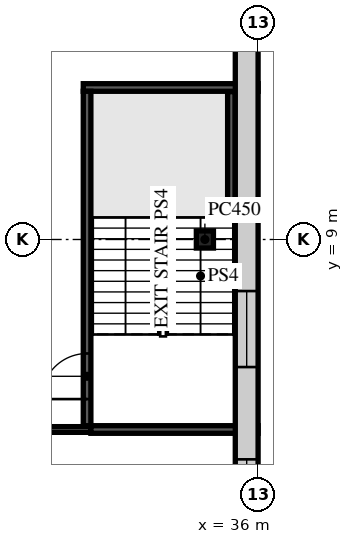
"""IFC4 building model, lengths in metres.
Left out: names, types, materials, properties, quantities, classifications, styles, units other than length and angle.
Written with IfcOpenShell. Run it as: python <this file> out.ifc"""

import sys

from ifc_helpers import new_model, si_unit, direction, frame, frame_2d, origin, origin_2d, place, context, subcontext, project, spatial, rectangle, extrude, element, fill, save


model = new_model("IFC4")
c1 = context("Model", 3, precision=1e-05, world=origin(), true_north=direction((0.0, 1.0)))
c2 = subcontext(c1, "Body", "Model", "MODEL_VIEW")
j1 = project(units=[si_unit("LENGTHUNIT", "METRE"), si_unit("PLANEANGLEUNIT", "RADIAN")], contexts=[c1])
p1 = place(None, origin())
s1 = spatial("IfcSite", under=j1, at=p1, CompositionType="ELEMENT")
p2 = place(p1, origin())
s2 = spatial("IfcBuilding", under=s1, at=p2, CompositionType="ELEMENT")
p3 = place(p2, frame((0.0, 0.0, 9.0)))
s3 = spatial("IfcBuildingStorey", under=s2, at=p3, CompositionType="ELEMENT", Elevation=9.0)
p4 = place(p3, frame((34.6, 9.0, 0.0), z_axis=(0.0, 0.0, 1.0), x_axis=(1.0, 0.0, 0.0)))
e1 = element("IfcColumn", 1, at=p4, inside=s3, PredefinedType="COLUMN", context=c2, shape_type="SweptSolid", body=[
    extrude(rectangle(XDim=0.45, YDim=0.45, at=origin_2d()), origin(), (0.0, 0.0, 1.0), 4.5),
])
p5 = place(p3, frame((28.075, 4.0, 0.0), z_axis=(0.0, 0.0, 1.0), x_axis=(1.0, 0.0, 0.0)))
e2 = element("IfcWall", 2, at=p5, inside=s3, PredefinedType="PARTITIONING", context=c2, shape_type="SweptSolid", body=[
    extrude(rectangle(XDim=3.525, YDim=0.15, at=frame_2d((1.763, 0.0))), origin(), (0.0, 0.0, 1.0), 4.1),
])
p6 = place(p3, frame((31.6, 4.0, 0.0), z_axis=(0.0, 0.0, 1.0), x_axis=(1.0, 0.0, 0.0)))
e3 = element("IfcWall", 3, at=p6, inside=s3, PredefinedType="PARTITIONING", context=c2, shape_type="SweptSolid", body=[
    extrude(rectangle(XDim=4.4, YDim=0.2, at=frame_2d((2.2, 0.0))), origin(), (0.0, 0.0, 1.0), 4.1),
])
p7 = place(p3, frame((31.4, 13.0, 0.0), z_axis=(0.0, 0.0, 1.0), x_axis=(1.0, 0.0, 0.0)))
e4 = element("IfcWall", 4, at=p7, inside=s3, PredefinedType="PARTITIONING", context=c2, shape_type="SweptSolid", body=[
    extrude(rectangle(XDim=4.6, YDim=0.2, at=frame_2d((2.3, 0.0))), origin(), (0.0, 0.0, 1.0), 4.1),
])
p8 = place(p3, frame((31.5, 4.1, 0.0), z_axis=(0.0, 0.0, 1.0), x_axis=(0.0, 1.0, 0.0)))
e5 = element("IfcWall", 5, at=p8, inside=s3, PredefinedType="PARTITIONING", context=c2, shape_type="SweptSolid", body=[
    extrude(rectangle(XDim=8.8, YDim=0.2, at=frame_2d((4.4, 0.0))), origin(), (0.0, 0.0, 1.0), 4.1),
])
p9 = place(p8, frame((0.7, 0.0, 0.0)))
e6 = element("IfcOpeningElement", 6, at=p9, cuts=e5, PredefinedType="OPENING", context=c2, shape_type="SweptSolid", body=[
    extrude(rectangle(XDim=1.2, YDim=2.1, at=frame_2d((0.6, 1.05))), frame((0.0, 0.11, 0.0), z_axis=(0.0, -1.0, 0.0), x_axis=(1.0, 0.0, 0.0)), (0.0, 0.0, 1.0), 0.22),
])
p10 = place(p3, frame((35.298, 9.581, 0.0), z_axis=(0.0, 0.0, 1.0), x_axis=(0.0, 1.0, 0.0)))
e7 = element("IfcWall", 7, at=p10, inside=s3, PredefinedType="PARTITIONING", context=c2, shape_type="SweptSolid", body=[
    extrude(rectangle(XDim=3.309, YDim=0.2, at=frame_2d((1.655, 0.0))), origin(), (0.0, 0.0, 1.0), 4.1),
])
p11 = place(p3, frame((35.7, -30.876, 0.0), z_axis=(0.0, 0.0, 1.0), x_axis=(0.0, 1.0, 0.0)))
e8 = element("IfcWall", 8, at=p11, inside=s3, PredefinedType="STANDARD", context=c2, shape_type="SweptSolid", body=[
    extrude(rectangle(XDim=61.751, YDim=0.6, at=frame_2d((30.876, 0.0))), origin(), (0.0, 0.0, 1.0), 4.1),
])
p12 = place(p11, frame((1.152, 0.0, 0.9)))
e9 = element("IfcOpeningElement", 9, at=p12, cuts=e8, PredefinedType="OPENING", context=c2, shape_type="SweptSolid", body=[
    extrude(rectangle(XDim=2.0, YDim=3.0, at=frame_2d((1.0, 1.5))), frame((0.0, 0.31, 0.0), z_axis=(0.0, -1.0, 0.0), x_axis=(1.0, 0.0, 0.0)), (0.0, 0.0, 1.0), 0.62),
])
p13 = place(p11, frame((5.519, 0.0, 0.9)))
e10 = element("IfcOpeningElement", 10, at=p13, cuts=e8, PredefinedType="OPENING", context=c2, shape_type="SweptSolid", body=[
    extrude(rectangle(XDim=2.0, YDim=3.0, at=frame_2d((1.0, 1.5))), frame((0.0, 0.31, 0.0), z_axis=(0.0, -1.0, 0.0), x_axis=(1.0, 0.0, 0.0)), (0.0, 0.0, 1.0), 0.62),
])
p14 = place(p11, frame((9.947, 0.0, 0.9)))
e11 = element("IfcOpeningElement", 11, at=p14, cuts=e8, PredefinedType="OPENING", context=c2, shape_type="SweptSolid", body=[
    extrude(rectangle(XDim=2.0, YDim=3.0, at=frame_2d((1.0, 1.5))), frame((0.0, 0.31, 0.0), z_axis=(0.0, -1.0, 0.0), x_axis=(1.0, 0.0, 0.0)), (0.0, 0.0, 1.0), 0.62),
])
p15 = place(p11, frame((14.376, 0.0, 0.9)))
e12 = element("IfcOpeningElement", 12, at=p15, cuts=e8, PredefinedType="OPENING", context=c2, shape_type="SweptSolid", body=[
    extrude(rectangle(XDim=2.0, YDim=3.0, at=frame_2d((1.0, 1.5))), frame((0.0, 0.31, 0.0), z_axis=(0.0, -1.0, 0.0), x_axis=(1.0, 0.0, 0.0)), (0.0, 0.0, 1.0), 0.62),
])
p16 = place(p11, frame((18.804, 0.0, 0.9)))
e13 = element("IfcOpeningElement", 13, at=p16, cuts=e8, PredefinedType="OPENING", context=c2, shape_type="SweptSolid", body=[
    extrude(rectangle(XDim=2.0, YDim=3.0, at=frame_2d((1.0, 1.5))), frame((0.0, 0.31, 0.0), z_axis=(0.0, -1.0, 0.0), x_axis=(1.0, 0.0, 0.0)), (0.0, 0.0, 1.0), 0.62),
])
p17 = place(p11, frame((23.233, 0.0, 0.9)))
e14 = element("IfcOpeningElement", 14, at=p17, cuts=e8, PredefinedType="OPENING", context=c2, shape_type="SweptSolid", body=[
    extrude(rectangle(XDim=2.0, YDim=3.0, at=frame_2d((1.0, 1.5))), frame((0.0, 0.31, 0.0), z_axis=(0.0, -1.0, 0.0), x_axis=(1.0, 0.0, 0.0)), (0.0, 0.0, 1.0), 0.62),
])
p18 = place(p11, frame((27.662, 0.0, 0.9)))
e15 = element("IfcOpeningElement", 15, at=p18, cuts=e8, PredefinedType="OPENING", context=c2, shape_type="SweptSolid", body=[
    extrude(rectangle(XDim=2.0, YDim=3.0, at=frame_2d((1.0, 1.5))), frame((0.0, 0.31, 0.0), z_axis=(0.0, -1.0, 0.0), x_axis=(1.0, 0.0, 0.0)), (0.0, 0.0, 1.0), 0.62),
])
p19 = place(p11, frame((32.09, 0.0, 0.9)))
e16 = element("IfcOpeningElement", 16, at=p19, cuts=e8, PredefinedType="OPENING", context=c2, shape_type="SweptSolid", body=[
    extrude(rectangle(XDim=2.0, YDim=3.0, at=frame_2d((1.0, 1.5))), frame((0.0, 0.31, 0.0), z_axis=(0.0, -1.0, 0.0), x_axis=(1.0, 0.0, 0.0)), (0.0, 0.0, 1.0), 0.62),
])
p20 = place(p11, frame((36.519, 0.0, 0.9)))
e17 = element("IfcOpeningElement", 17, at=p20, cuts=e8, PredefinedType="OPENING", context=c2, shape_type="SweptSolid", body=[
    extrude(rectangle(XDim=2.0, YDim=3.0, at=frame_2d((1.0, 1.5))), frame((0.0, 0.31, 0.0), z_axis=(0.0, -1.0, 0.0), x_axis=(1.0, 0.0, 0.0)), (0.0, 0.0, 1.0), 0.62),
])
p21 = place(p11, frame((45.376, 0.0, 0.9)))
e18 = element("IfcOpeningElement", 18, at=p21, cuts=e8, PredefinedType="OPENING", context=c2, shape_type="SweptSolid", body=[
    extrude(rectangle(XDim=2.0, YDim=3.0, at=frame_2d((1.0, 1.5))), frame((0.0, 0.31, 0.0), z_axis=(0.0, -1.0, 0.0), x_axis=(1.0, 0.0, 0.0)), (0.0, 0.0, 1.0), 0.62),
])
p22 = place(p11, frame((49.804, 0.0, 0.9)))
e19 = element("IfcOpeningElement", 19, at=p22, cuts=e8, PredefinedType="OPENING", context=c2, shape_type="SweptSolid", body=[
    extrude(rectangle(XDim=2.0, YDim=3.0, at=frame_2d((1.0, 1.5))), frame((0.0, 0.31, 0.0), z_axis=(0.0, -1.0, 0.0), x_axis=(1.0, 0.0, 0.0)), (0.0, 0.0, 1.0), 0.62),
])
p23 = place(p11, frame((58.599, 0.0, 0.9)))
e20 = element("IfcOpeningElement", 20, at=p23, cuts=e8, PredefinedType="OPENING", context=c2, shape_type="SweptSolid", body=[
    extrude(rectangle(XDim=2.0, YDim=3.0, at=frame_2d((1.0, 1.5))), frame((0.0, 0.31, 0.0), z_axis=(0.0, -1.0, 0.0), x_axis=(1.0, 0.0, 0.0)), (0.0, 0.0, 1.0), 0.62),
])
p24 = place(p9, frame((1.2, 0.0, 0.0), z_axis=(0.0, 0.0, 1.0), x_axis=(-1.0, 0.0, 0.0)))
e21 = element("IfcDoor", 21, at=p24, inside=s3, OperationType="SINGLE_SWING_RIGHT", PredefinedType="DOOR", context=c2, shape_type="SweptSolid", body=[
    extrude(rectangle(XDim=1.2, YDim=2.1, at=frame_2d((0.6, 1.05))), frame((0.0, 0.025, 0.0), z_axis=(0.0, -1.0, 0.0), x_axis=(1.0, 0.0, 0.0)), (0.0, 0.0, 1.0), 0.05),
])
fill(e6, e21)
p25 = place(p19, origin())
e22 = element("IfcWindow", 22, at=p25, inside=s3, PartitioningType="SINGLE_PANEL", PredefinedType="WINDOW", context=c2, shape_type="SweptSolid", body=[
    extrude(rectangle(XDim=2.0, YDim=3.0, at=frame_2d((1.0, 1.5))), frame((0.0, 0.03, 0.0), z_axis=(0.0, -1.0, 0.0), x_axis=(1.0, 0.0, 0.0)), (0.0, 0.0, 1.0), 0.06),
])
fill(e16, e22)
p26 = place(p20, origin())
e23 = element("IfcWindow", 23, at=p26, inside=s3, PartitioningType="SINGLE_PANEL", PredefinedType="WINDOW", context=c2, shape_type="SweptSolid", body=[
    extrude(rectangle(XDim=2.0, YDim=3.0, at=frame_2d((1.0, 1.5))), frame((0.0, 0.03, 0.0), z_axis=(0.0, -1.0, 0.0), x_axis=(1.0, 0.0, 0.0)), (0.0, 0.0, 1.0), 0.06),
])
fill(e17, e23)
save(model, sys.argv[1])
